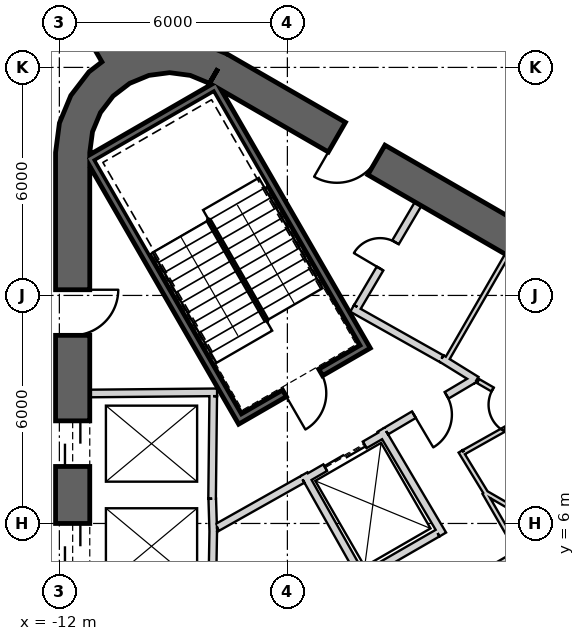
"""IFC4 building model, lengths in metres.
Left out: names, types, materials, properties, quantities, classifications, styles, units other than length and angle.
Written with IfcOpenShell. Run it as: python <this file> out.ifc"""

import sys

from ifc_helpers import new_model, si_unit, direction, frame, frame_2d, origin, place, context, subcontext, project, spatial, polyline, rectangle, outline, extrude, element, fill, save


model = new_model("IFC4")
c1 = context("Model", 3, precision=1e-05, world=origin(), true_north=direction((0.0, 1.0)))
c2 = subcontext(c1, "Body", "Model", "MODEL_VIEW")
j1 = project(units=[si_unit("LENGTHUNIT", "METRE"), si_unit("PLANEANGLEUNIT", "RADIAN")], contexts=[c1])
p1 = place(None, origin())
s1 = spatial("IfcSite", under=j1, at=p1, CompositionType="ELEMENT")
p2 = place(p1, origin())
s2 = spatial("IfcBuilding", under=s1, at=p2, CompositionType="ELEMENT")
p3 = place(p2, frame((0.0, 0.0, 229.2)))
s3 = spatial("IfcBuildingStorey", under=s2, at=p3, CompositionType="ELEMENT", Elevation=229.2)
p4 = place(p3, frame((19.475, 2.208, 0.0), z_axis=(0.0, 0.0, 1.0), x_axis=(-0.866028369851, 0.499994862586, 0.0)))
e1 = element("IfcWall", 1, at=p4, inside=s3, PredefinedType="SHEAR", context=c2, shape_type="SweptSolid", body=[
    extrude(rectangle(XDim=31.523, YDim=0.9, at=frame_2d((15.762, 0.0))), origin(), (0.0, 0.0, 1.0), 4.0),
])
p5 = place(p4, frame((7.062, 0.0, 0.0)))
e2 = element("IfcOpeningElement", 2, at=p5, cuts=e1, PredefinedType="OPENING", context=c2, shape_type="SweptSolid", body=[
    extrude(rectangle(XDim=1.2, YDim=2.4, at=frame_2d((0.6, 1.2))), frame((0.0, 0.46, 0.0), z_axis=(0.0, -1.0, 0.0), x_axis=(1.0, 0.0, 0.0)), (0.0, 0.0, 1.0), 0.92),
])
p6 = place(p4, frame((3.612, 0.0, 0.0)))
e3 = element("IfcOpeningElement", 3, at=p6, cuts=e1, PredefinedType="OPENING", context=c2, shape_type="SweptSolid", body=[
    extrude(rectangle(XDim=1.2, YDim=2.4, at=frame_2d((0.6, 1.2))), frame((0.0, 0.46, 0.0), z_axis=(0.0, -1.0, 0.0), x_axis=(1.0, 0.0, 0.0)), (0.0, 0.0, 1.0), 0.92),
])
p7 = place(p4, frame((26.712, 0.0, 0.0)))
e4 = element("IfcOpeningElement", 4, at=p7, cuts=e1, PredefinedType="OPENING", context=c2, shape_type="SweptSolid", body=[
    extrude(rectangle(XDim=1.2, YDim=2.4, at=frame_2d((0.6, 1.2))), frame((0.0, 0.46, 0.0), z_axis=(0.0, -1.0, 0.0), x_axis=(1.0, 0.0, 0.0)), (0.0, 0.0, 1.0), 0.92),
])
p8 = place(p3, frame((-11.65, 15.762, 0.0), z_axis=(0.0, 0.0, 1.0), x_axis=(0.0, -1.0, 0.0)))
e5 = element("IfcWall", 5, at=p8, inside=s3, PredefinedType="SHEAR", context=c2, shape_type="SweptSolid", body=[
    extrude(rectangle(XDim=31.523, YDim=0.9, at=frame_2d((15.762, 0.0))), origin(), (0.0, 0.0, 1.0), 4.0),
])
p9 = place(p8, frame((7.062, 0.0, 0.0)))
e6 = element("IfcOpeningElement", 6, at=p9, cuts=e5, PredefinedType="OPENING", context=c2, shape_type="SweptSolid", body=[
    extrude(rectangle(XDim=1.2, YDim=2.4, at=frame_2d((0.6, 1.2))), frame((0.0, 0.46, 0.0), z_axis=(0.0, -1.0, 0.0), x_axis=(1.0, 0.0, 0.0)), (0.0, 0.0, 1.0), 0.92),
])
p10 = place(p8, frame((9.762, 0.0, 0.0)))
e7 = element("IfcOpeningElement", 7, at=p10, cuts=e5, PredefinedType="OPENING", context=c2, shape_type="SweptSolid", body=[
    extrude(rectangle(XDim=1.2, YDim=2.4, at=frame_2d((0.6, 1.2))), frame((0.0, 0.46, 0.0), z_axis=(0.0, -1.0, 0.0), x_axis=(1.0, 0.0, 0.0)), (0.0, 0.0, 1.0), 0.92),
])
p11 = place(p8, frame((12.462, 0.0, 0.0)))
e8 = element("IfcOpeningElement", 8, at=p11, cuts=e5, PredefinedType="OPENING", context=c2, shape_type="SweptSolid", body=[
    extrude(rectangle(XDim=1.2, YDim=2.4, at=frame_2d((0.6, 1.2))), frame((0.0, 0.46, 0.0), z_axis=(0.0, -1.0, 0.0), x_axis=(1.0, 0.0, 0.0)), (0.0, 0.0, 1.0), 0.92),
])
p12 = place(p8, frame((15.162, 0.0, 0.0)))
e9 = element("IfcOpeningElement", 9, at=p12, cuts=e5, PredefinedType="OPENING", context=c2, shape_type="SweptSolid", body=[
    extrude(rectangle(XDim=1.2, YDim=2.4, at=frame_2d((0.6, 1.2))), frame((0.0, 0.46, 0.0), z_axis=(0.0, -1.0, 0.0), x_axis=(1.0, 0.0, 0.0)), (0.0, 0.0, 1.0), 0.92),
])
p13 = place(p8, frame((17.862, 0.0, 0.0)))
e10 = element("IfcOpeningElement", 10, at=p13, cuts=e5, PredefinedType="OPENING", context=c2, shape_type="SweptSolid", body=[
    extrude(rectangle(XDim=1.2, YDim=2.4, at=frame_2d((0.6, 1.2))), frame((0.0, 0.46, 0.0), z_axis=(0.0, -1.0, 0.0), x_axis=(1.0, 0.0, 0.0)), (0.0, 0.0, 1.0), 0.92),
])
p14 = place(p8, frame((20.562, 0.0, 0.0)))
e11 = element("IfcOpeningElement", 11, at=p14, cuts=e5, PredefinedType="OPENING", context=c2, shape_type="SweptSolid", body=[
    extrude(rectangle(XDim=1.2, YDim=2.4, at=frame_2d((0.6, 1.2))), frame((0.0, 0.46, 0.0), z_axis=(0.0, -1.0, 0.0), x_axis=(1.0, 0.0, 0.0)), (0.0, 0.0, 1.0), 0.92),
])
p15 = place(p8, frame((23.262, 0.0, 0.0)))
e12 = element("IfcOpeningElement", 12, at=p15, cuts=e5, PredefinedType="OPENING", context=c2, shape_type="SweptSolid", body=[
    extrude(rectangle(XDim=1.2, YDim=2.4, at=frame_2d((0.6, 1.2))), frame((0.0, 0.46, 0.0), z_axis=(0.0, -1.0, 0.0), x_axis=(1.0, 0.0, 0.0)), (0.0, 0.0, 1.0), 0.92),
])
p16 = place(p8, frame((3.612, 0.0, 0.0)))
e13 = element("IfcOpeningElement", 13, at=p16, cuts=e5, PredefinedType="OPENING", context=c2, shape_type="SweptSolid", body=[
    extrude(rectangle(XDim=1.2, YDim=2.4, at=frame_2d((0.6, 1.2))), frame((0.0, 0.46, 0.0), z_axis=(0.0, -1.0, 0.0), x_axis=(1.0, 0.0, 0.0)), (0.0, 0.0, 1.0), 0.92),
])
p17 = place(p8, frame((26.712, 0.0, 0.0)))
e14 = element("IfcOpeningElement", 14, at=p17, cuts=e5, PredefinedType="OPENING", context=c2, shape_type="SweptSolid", body=[
    extrude(rectangle(XDim=1.2, YDim=2.4, at=frame_2d((0.6, 1.2))), frame((0.0, 0.46, 0.0), z_axis=(0.0, -1.0, 0.0), x_axis=(1.0, 0.0, 0.0)), (0.0, 0.0, 1.0), 0.92),
])
p18 = place(p3, origin())
e15 = element("IfcWall", 15, at=p18, inside=s3, PredefinedType="SHEAR", context=c2, shape_type="SweptSolid", body=[
    extrude(outline(polyline([(-7.6, 18.36), (-8.323, 18.659), (-9.1, 18.762), (-9.876, 18.659), (-10.6, 18.36), (-11.221, 17.883), (-11.698, 17.262), (-11.998, 16.538), (-12.1, 15.762), (-11.2, 15.762), (-11.128, 16.305), (-10.919, 16.812), (-10.585, 17.247), (-10.15, 17.58), (-9.644, 17.79), (-9.1, 17.862), (-8.556, 17.79), (-8.05, 17.58), (-7.6, 18.36)])), origin(), (0.0, 0.0, 1.0), 4.0),
])
p19 = place(p3, frame((-10.575, 18.316, 0.0), z_axis=(0.0, 0.0, 1.0), x_axis=(-0.499996344484, 0.866027514288, 0.0)))
e16 = element("IfcWall", 16, at=p19, inside=s3, PredefinedType="SHEAR", context=c2, shape_type="SweptSolid", body=[
    extrude(rectangle(XDim=11.368, YDim=0.7, at=frame_2d((5.684, 0.0))), origin(), (0.0, 0.0, 1.0), 4.0),
])
p20 = place(p3, frame((-11.2, 9.42, 0.0), z_axis=(0.0, 0.0, 1.0), x_axis=(0.999957167047, 0.009255488683, 0.0)))
e17 = element("IfcWall", 17, at=p20, inside=s3, PredefinedType="PLUMBINGWALL", context=c2, shape_type="SweptSolid", body=[
    extrude(rectangle(XDim=3.35, YDim=0.2, at=frame_2d((1.675, 0.0))), origin(), (0.0, 0.0, 1.0), 3.7),
])
p21 = place(p3, frame((-7.951, 9.35, 0.0), z_axis=(0.0, 0.0, 1.0), x_axis=(-0.011120469654, -0.999938165666, 0.0)))
e18 = element("IfcWall", 18, at=p21, inside=s3, PredefinedType="PLUMBINGWALL", context=c2, shape_type="SweptSolid", body=[
    extrude(rectangle(XDim=2.7, YDim=0.2, at=frame_2d((1.35, 0.0))), origin(), (0.0, 0.0, 1.0), 3.7),
])
p22 = place(p3, frame((-7.977, 6.65, 0.0), z_axis=(0.0, 0.0, 1.0), x_axis=(0.030861509705, -0.999523670164, 0.0)))
e19 = element("IfcWall", 19, at=p22, inside=s3, PredefinedType="PLUMBINGWALL", context=c2, shape_type="SweptSolid", body=[
    extrude(rectangle(XDim=0.878, YDim=0.2, at=frame_2d((0.439, 0.0))), origin(), (0.0, 0.0, 1.0), 3.7),
])
p23 = place(p3, frame((-7.949, 5.894, 0.0), z_axis=(0.0, 0.0, 1.0), x_axis=(-0.016809909365, -0.999858703491, 0.0)))
e20 = element("IfcWall", 20, at=p23, inside=s3, PredefinedType="PLUMBINGWALL", context=c2, shape_type="SweptSolid", body=[
    extrude(rectangle(XDim=1.844, YDim=0.2, at=frame_2d((0.922, 0.0))), origin(), (0.0, 0.0, 1.0), 3.7),
])
p24 = place(p3, frame((-11.245, 15.678, -0.3), z_axis=(0.0, 0.0, 1.0), x_axis=(0.499977274689, -0.866038523851, 0.0)))
e21 = element("IfcWall", 21, at=p24, inside=s3, PredefinedType="SHEAR", context=c2, shape_type="SweptSolid", body=[
    extrude(rectangle(XDim=8.1, YDim=0.2, at=frame_2d((4.05, 0.0))), origin(), (0.0, 0.0, 1.0), 4.0),
])
p25 = place(p3, frame((-7.818, 17.541, -0.3), z_axis=(0.0, 0.0, 1.0), x_axis=(-0.866044365799, -0.499967155389, 0.0)))
e22 = element("IfcWall", 22, at=p25, inside=s3, PredefinedType="SHEAR", context=c2, shape_type="SweptSolid", body=[
    extrude(rectangle(XDim=3.8, YDim=0.2, at=frame_2d((1.9, 0.0))), origin(), (0.0, 0.0, 1.0), 4.0),
])
p26 = place(p3, frame((-7.854, 17.405, -0.3), z_axis=(0.0, 0.0, 1.0), x_axis=(0.499997992926, -0.866026562566, 0.0)))
e23 = element("IfcWall", 23, at=p26, inside=s3, PredefinedType="SHEAR", context=c2, shape_type="SweptSolid", body=[
    extrude(rectangle(XDim=7.9, YDim=0.2, at=frame_2d((3.95, 0.0))), origin(), (0.0, 0.0, 1.0), 4.0),
])
p27 = place(p3, frame((-7.159, 8.8, -0.3), z_axis=(0.0, 0.0, 1.0), x_axis=(0.866047807691, 0.499961193289, 0.0)))
e24 = element("IfcWall", 24, at=p27, inside=s3, PredefinedType="SHEAR", context=c2, shape_type="SweptSolid", body=[
    extrude(rectangle(XDim=3.6, YDim=0.2, at=frame_2d((1.8, 0.0))), origin(), (0.0, 0.0, 1.0), 4.0),
])
p28 = place(p27, frame((1.25, 0.0, 0.3)))
e25 = element("IfcOpeningElement", 25, at=p28, cuts=e24, PredefinedType="OPENING", context=c2, shape_type="SweptSolid", body=[
    extrude(rectangle(XDim=1.1, YDim=2.1, at=frame_2d((0.55, 1.05))), frame((0.0, 0.11, 0.0), z_axis=(0.0, -1.0, 0.0), x_axis=(1.0, 0.0, 0.0)), (0.0, 0.0, 1.0), 0.22),
])
p29 = place(p3, frame((-5.524, 7.168, 0.0), z_axis=(0.0, 0.0, 1.0), x_axis=(0.866024647952, 0.500001309137, 0.0)))
e26 = element("IfcWall", 26, at=p29, inside=s3, PredefinedType="PLUMBINGWALL", context=c2, shape_type="SweptSolid", body=[
    extrude(rectangle(XDim=2.4, YDim=0.2, at=frame_2d((1.2, 0.0))), origin(), (0.0, 0.0, 1.0), 3.7),
])
p30 = place(p29, frame((0.6, 0.0, 0.0)))
e27 = element("IfcOpeningElement", 27, at=p30, cuts=e26, PredefinedType="OPENING", context=c2, shape_type="SweptSolid", body=[
    extrude(rectangle(XDim=1.2, YDim=2.4, at=frame_2d((0.6, 1.2))), frame((0.0, 0.11, 0.0), z_axis=(0.0, -1.0, 0.0), x_axis=(1.0, 0.0, 0.0)), (0.0, 0.0, 1.0), 0.22),
])
p31 = place(p3, frame((-4.039, 4.596, 0.0), z_axis=(0.0, 0.0, 1.0), x_axis=(-0.491322718731, 0.870977603649, 0.0)))
e28 = element("IfcWall", 28, at=p31, inside=s3, PredefinedType="PLUMBINGWALL", context=c2, shape_type="SweptSolid", body=[
    extrude(rectangle(XDim=3.1, YDim=0.2, at=frame_2d((1.55, 0.0))), origin(), (0.0, 0.0, 1.0), 3.7),
])
p32 = place(p3, frame((-3.538, 8.465, 0.0), z_axis=(0.0, 0.0, 1.0), x_axis=(0.508616218331, -0.860993346345, 0.0)))
e29 = element("IfcWall", 29, at=p32, inside=s3, PredefinedType="PLUMBINGWALL", context=c2, shape_type="SweptSolid", body=[
    extrude(rectangle(XDim=3.2, YDim=0.2, at=frame_2d((1.6, 0.0))), origin(), (0.0, 0.0, 1.0), 3.7),
])
p33 = place(p3, frame((-2.047, 5.746, 0.0), z_axis=(0.0, 0.0, 1.0), x_axis=(-0.86606290101, -0.499935047276, 0.0)))
e30 = element("IfcWall", 30, at=p33, inside=s3, PredefinedType="PLUMBINGWALL", context=c2, shape_type="SweptSolid", body=[
    extrude(rectangle(XDim=2.054, YDim=0.2, at=frame_2d((1.027, 0.0))), origin(), (0.0, 0.0, 1.0), 3.7),
])
p34 = place(p3, frame((-0.981, 9.746, 0.0), z_axis=(0.0, 0.0, 1.0), x_axis=(0.866027945518, -0.499995597562, 0.0)))
e31 = element("IfcWall", 31, at=p34, inside=s3, PredefinedType="PARTITIONING", context=c2, shape_type="SweptSolid", body=[
    extrude(rectangle(XDim=1.702, YDim=0.12, at=frame_2d((0.851, 0.0))), origin(), (0.0, 0.0, 1.0), 3.7),
])
p35 = place(p34, frame((0.441, 0.0, 0.0)))
e32 = element("IfcOpeningElement", 32, at=p35, cuts=e31, PredefinedType="OPENING", context=c2, shape_type="SweptSolid", body=[
    extrude(rectangle(XDim=0.8, YDim=2.1, at=frame_2d((0.4, 1.05))), frame((0.0, 0.07, 0.0), z_axis=(0.0, -1.0, 0.0), x_axis=(1.0, 0.0, 0.0)), (0.0, 0.0, 1.0), 0.14),
])
p36 = place(p3, frame((-0.22, 13.06, 0.0), z_axis=(0.0, 0.0, 1.0), x_axis=(-0.499984717929, -0.866034226713, 0.0)))
e33 = element("IfcWall", 33, at=p36, inside=s3, PredefinedType="PARTITIONING", context=c2, shape_type="SweptSolid", body=[
    extrude(rectangle(XDim=3.25, YDim=0.12, at=frame_2d((1.625, 0.0))), origin(), (0.0, 0.0, 1.0), 3.7),
])
p37 = place(p3, frame((-1.941, 10.339, 0.0), z_axis=(0.0, 0.0, 1.0), x_axis=(0.850216889117, -0.526432561171, 0.0)))
e34 = element("IfcWall", 34, at=p37, inside=s3, PredefinedType="PARTITIONING", context=c2, shape_type="SweptSolid", body=[
    extrude(rectangle(XDim=1.078, YDim=0.2, at=frame_2d((0.539, 0.0))), origin(), (0.0, 0.0, 1.0), 3.7),
])
p38 = place(p3, frame((-4.296, 11.659, 0.0), z_axis=(0.0, 0.0, 1.0), x_axis=(0.871534483978, -0.490334215854, 0.0)))
e35 = element("IfcWall", 35, at=p38, inside=s3, PredefinedType="PARTITIONING", context=c2, shape_type="SweptSolid", body=[
    extrude(rectangle(XDim=2.7, YDim=0.2, at=frame_2d((1.35, 0.0))), origin(), (0.0, 0.0, 1.0), 3.7),
])
p39 = place(p3, frame((-2.558, 14.409, 0.0), z_axis=(0.0, 0.0, 1.0), x_axis=(-0.508018930956, -0.861345903683, 0.0)))
e36 = element("IfcWall", 36, at=p39, inside=s3, PredefinedType="PARTITIONING", context=c2, shape_type="SweptSolid", body=[
    extrude(rectangle(XDim=3.15, YDim=0.2, at=frame_2d((1.575, 0.0))), origin(), (0.0, 0.0, 1.0), 3.7),
])
p40 = place(p39, frame((1.175, 0.0, 0.0)))
e37 = element("IfcOpeningElement", 37, at=p40, cuts=e36, PredefinedType="OPENING", context=c2, shape_type="SweptSolid", body=[
    extrude(rectangle(XDim=0.8, YDim=2.1, at=frame_2d((0.4, 1.05))), frame((0.0, 0.11, 0.0), z_axis=(0.0, -1.0, 0.0), x_axis=(1.0, 0.0, 0.0)), (0.0, 0.0, 1.0), 0.22),
])
p41 = place(p3, frame((-5.6, 7.16, 0.0), z_axis=(0.0, 0.0, 1.0), x_axis=(-0.871340486379, -0.490678873396, 0.0)))
e38 = element("IfcWall", 38, at=p41, inside=s3, PredefinedType="PARTITIONING", context=c2, shape_type="SweptSolid", body=[
    extrude(rectangle(XDim=2.581, YDim=0.2, at=frame_2d((1.291, 0.0))), origin(), (0.0, 0.0, 1.0), 3.7),
])
p42 = place(p3, frame((-1.069, 9.81, 0.0), z_axis=(0.0, 0.0, 1.0), x_axis=(-0.860617791406, -0.509251428192, 0.0)))
e39 = element("IfcWall", 39, at=p42, inside=s3, PredefinedType="PARTITIONING", context=c2, shape_type="SweptSolid", body=[
    extrude(rectangle(XDim=2.709, YDim=0.2, at=frame_2d((1.354, 0.0))), origin(), (0.0, 0.0, 1.0), 3.7),
])
p43 = place(p42, frame((0.861, 0.0, 0.0)))
e40 = element("IfcOpeningElement", 40, at=p43, cuts=e39, PredefinedType="OPENING", context=c2, shape_type="SweptSolid", body=[
    extrude(rectangle(XDim=1.0, YDim=2.1, at=frame_2d((0.5, 1.05))), frame((0.0, 0.11, 0.0), z_axis=(0.0, -1.0, 0.0), x_axis=(1.0, 0.0, 0.0)), (0.0, 0.0, 1.0), 0.22),
])
p44 = place(p3, frame((-0.827, 6.832, 0.0), z_axis=(0.0, 0.0, 1.0), x_axis=(0.866020293397, -0.500008851346, 0.0)))
e41 = element("IfcWall", 41, at=p44, inside=s3, PredefinedType="PARTITIONING", context=c2, shape_type="SweptSolid", body=[
    extrude(rectangle(XDim=8.264, YDim=0.12, at=frame_2d((4.132, 0.0))), origin(), (0.0, 0.0, 1.0), 3.7),
])
p45 = place(p3, frame((-1.443, 7.896, 0.0), z_axis=(0.0, 0.0, 1.0), x_axis=(0.520289543849, -0.853989924157, 0.0)))
e42 = element("IfcWall", 42, at=p45, inside=s3, PredefinedType="PARTITIONING", context=c2, shape_type="SweptSolid", body=[
    extrude(rectangle(XDim=1.311, YDim=0.12, at=frame_2d((0.656, 0.0))), origin(), (0.0, 0.0, 1.0), 3.7),
])
p46 = place(p3, frame((0.414, 8.871, 0.0), z_axis=(0.0, 0.0, 1.0), x_axis=(-0.871809386997, -0.48984527429, 0.0)))
e43 = element("IfcWall", 43, at=p46, inside=s3, PredefinedType="PARTITIONING", context=c2, shape_type="SweptSolid", body=[
    extrude(rectangle(XDim=2.034, YDim=0.12, at=frame_2d((1.017, 0.0))), origin(), (0.0, 0.0, 1.0), 3.7),
])
p47 = place(p3, frame((0.14, 5.277, 0.0), z_axis=(0.0, 0.0, 1.0), x_axis=(-0.866000971088, -0.500042316284, 0.0)))
e44 = element("IfcWall", 44, at=p47, inside=s3, PredefinedType="PARTITIONING", context=c2, shape_type="SweptSolid", body=[
    extrude(rectangle(XDim=1.85, YDim=0.12, at=frame_2d((0.925, 0.0))), origin(), (0.0, 0.0, 1.0), 3.7),
])
p48 = place(p3, frame((-0.812, 6.806, 0.0), z_axis=(0.0, 0.0, 1.0), x_axis=(0.500046227757, -0.865998712531, 0.0)))
e45 = element("IfcWall", 45, at=p48, inside=s3, PredefinedType="PARTITIONING", context=c2, shape_type="SweptSolid", body=[
    extrude(rectangle(XDim=1.74, YDim=0.12, at=frame_2d((0.87, 0.0))), origin(), (0.0, 0.0, 1.0), 3.7),
])
p49 = place(p3, frame((9.825, 12.918, 0.0), z_axis=(0.0, 0.0, 1.0), x_axis=(-0.866022708987, 0.500004667497, 0.0)))
e46 = element("IfcWall", 46, at=p49, inside=s3, PredefinedType="PARTITIONING", context=c2, shape_type="SweptSolid", body=[
    extrude(rectangle(XDim=18.496, YDim=0.2, at=frame_2d((9.248, 0.0))), origin(), (0.0, 0.0, 1.0), 2.88),
])
p50 = place(p28, origin())
e47 = element("IfcDoor", 47, at=p50, inside=s3, OperationType="SINGLE_SWING_LEFT", PredefinedType="USERDEFINED", context=c2, shape_type="SweptSolid", body=[
    extrude(rectangle(XDim=1.1, YDim=2.1, at=frame_2d((0.55, 1.05))), frame((0.0, 0.025, 0.0), z_axis=(0.0, -1.0, 0.0), x_axis=(1.0, 0.0, 0.0)), (0.0, 0.0, 1.0), 0.05),
])
fill(e25, e47)
p51 = place(p43, origin())
e48 = element("IfcDoor", 48, at=p51, inside=s3, OperationType="SINGLE_SWING_RIGHT", PredefinedType="USERDEFINED", context=c2, shape_type="SweptSolid", body=[
    extrude(rectangle(XDim=1.0, YDim=2.1, at=frame_2d((0.5, 1.05))), frame((0.0, 0.025, 0.0), z_axis=(0.0, -1.0, 0.0), x_axis=(1.0, 0.0, 0.0)), (0.0, 0.0, 1.0), 0.05),
])
fill(e40, e48)
p52 = place(p30, origin())
e49 = element("IfcDoor", 49, at=p52, inside=s3, OperationType="SLIDING_TO_LEFT", PredefinedType="USERDEFINED", context=c2, shape_type="SweptSolid", body=[
    extrude(rectangle(XDim=1.2, YDim=2.4, at=frame_2d((0.6, 1.2))), frame((0.0, 0.025, 0.0), z_axis=(0.0, -1.0, 0.0), x_axis=(1.0, 0.0, 0.0)), (0.0, 0.0, 1.0), 0.05),
])
fill(e27, e49)
p53 = place(p35, origin())
e50 = element("IfcDoor", 50, at=p53, inside=s3, OperationType="SINGLE_SWING_LEFT", PredefinedType="USERDEFINED", context=c2, shape_type="SweptSolid", body=[
    extrude(rectangle(XDim=0.8, YDim=2.1, at=frame_2d((0.4, 1.05))), frame((0.0, 0.025, 0.0), z_axis=(0.0, -1.0, 0.0), x_axis=(1.0, 0.0, 0.0)), (0.0, 0.0, 1.0), 0.05),
])
fill(e32, e50)
p54 = place(p40, origin())
e51 = element("IfcDoor", 51, at=p54, inside=s3, OperationType="SINGLE_SWING_RIGHT", PredefinedType="USERDEFINED", context=c2, shape_type="SweptSolid", body=[
    extrude(rectangle(XDim=0.8, YDim=2.1, at=frame_2d((0.4, 1.05))), frame((0.0, 0.025, 0.0), z_axis=(0.0, -1.0, 0.0), x_axis=(1.0, 0.0, 0.0)), (0.0, 0.0, 1.0), 0.05),
])
fill(e37, e51)
p55 = place(p9, origin())
e52 = element("IfcDoor", 52, at=p55, inside=s3, OperationType="SLIDING_TO_LEFT", PredefinedType="USERDEFINED", context=c2, shape_type="SweptSolid", body=[
    extrude(rectangle(XDim=1.2, YDim=2.4, at=frame_2d((0.6, 1.2))), frame((0.0, 0.025, 0.0), z_axis=(0.0, -1.0, 0.0), x_axis=(1.0, 0.0, 0.0)), (0.0, 0.0, 1.0), 0.05),
])
fill(e6, e52)
p56 = place(p10, origin())
e53 = element("IfcDoor", 53, at=p56, inside=s3, OperationType="SLIDING_TO_LEFT", PredefinedType="USERDEFINED", context=c2, shape_type="SweptSolid", body=[
    extrude(rectangle(XDim=1.2, YDim=2.4, at=frame_2d((0.6, 1.2))), frame((0.0, 0.025, 0.0), z_axis=(0.0, -1.0, 0.0), x_axis=(1.0, 0.0, 0.0)), (0.0, 0.0, 1.0), 0.05),
])
fill(e7, e53)
p57 = place(p7, origin())
e54 = element("IfcDoor", 54, at=p57, inside=s3, OperationType="SINGLE_SWING_RIGHT", PredefinedType="USERDEFINED", context=c2, shape_type="SweptSolid", body=[
    extrude(rectangle(XDim=1.2, YDim=2.4, at=frame_2d((0.6, 1.2))), frame((0.0, 0.025, 0.0), z_axis=(0.0, -1.0, 0.0), x_axis=(1.0, 0.0, 0.0)), (0.0, 0.0, 1.0), 0.05),
])
fill(e4, e54)
p58 = place(p16, origin())
e55 = element("IfcDoor", 55, at=p58, inside=s3, OperationType="SINGLE_SWING_RIGHT", PredefinedType="USERDEFINED", context=c2, shape_type="SweptSolid", body=[
    extrude(rectangle(XDim=1.2, YDim=2.4, at=frame_2d((0.6, 1.2))), frame((0.0, 0.025, 0.0), z_axis=(0.0, -1.0, 0.0), x_axis=(1.0, 0.0, 0.0)), (0.0, 0.0, 1.0), 0.05),
])
fill(e13, e55)
save(model, sys.argv[1])
